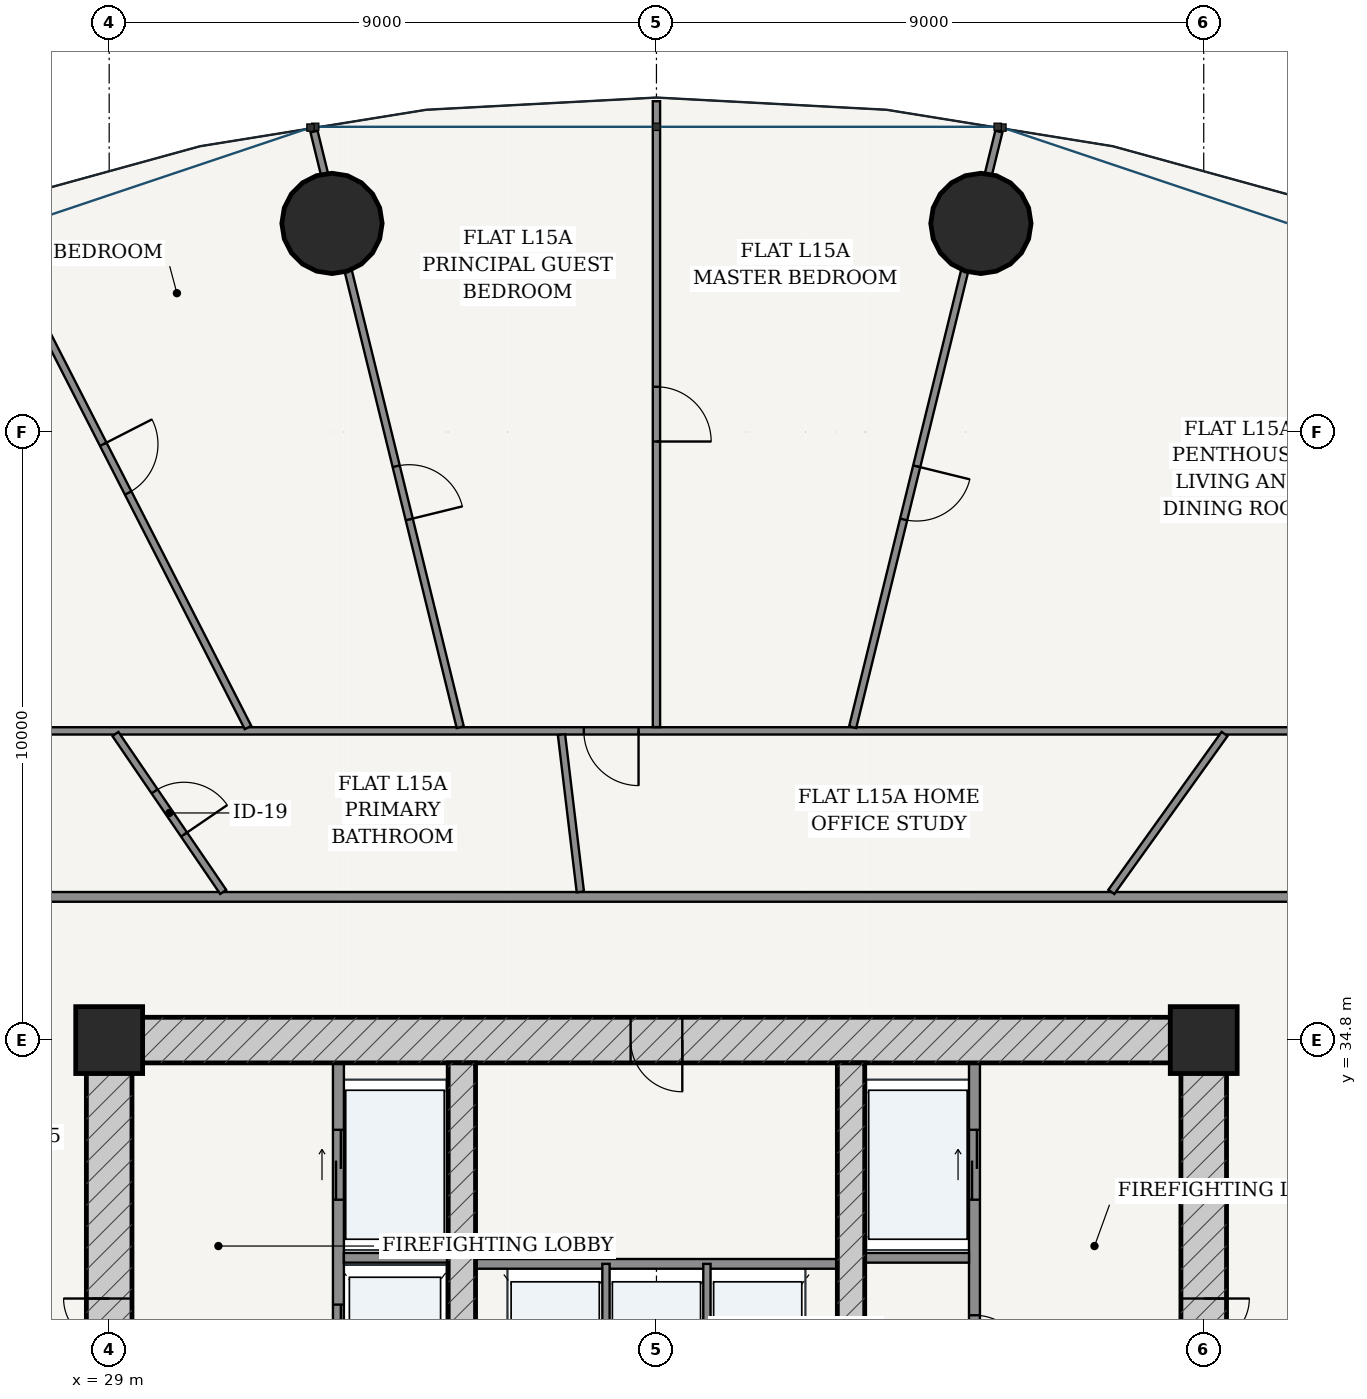
"""IFC4 building model, lengths in metres.
Left out: names, types, materials, properties, quantities, classifications, styles, units other than length and angle.
Written with IfcOpenShell. Run it as: python <this file> out.ifc"""

import sys

from ifc_helpers import new_model, si_unit, direction, frame, frame_2d, origin, origin_2d, place, context, subcontext, project, spatial, rectangle, hollow_circle, extrude, source, transform, mapped, element, fill, save


model = new_model("IFC4")
c1 = context("Model", 3, precision=1e-05, world=origin(), true_north=direction((-0.2419218956, 0.970295726276)))
c2 = subcontext(c1, "Body", "Model", "MODEL_VIEW")
j1 = project(units=[si_unit("LENGTHUNIT", "METRE"), si_unit("PLANEANGLEUNIT", "RADIAN")], contexts=[c1])
p1 = place(None, origin())
s1 = spatial("IfcSite", under=j1, at=p1, CompositionType="ELEMENT")
p2 = place(p1, origin())
s2 = spatial("IfcBuilding", under=s1, at=p2, CompositionType="ELEMENT")
p3 = place(p2, frame((0.0, 0.0, 60.0)))
s3 = spatial("IfcBuildingStorey", under=s2, at=p3, CompositionType="ELEMENT", Elevation=60.0)
for number, where, z_axis, x_axis in (
    (1, (47.0, 34.8, 0.0), (0.0, 0.0, 1.0), (1.0, 0.0, 0.0)),
    (2, (29.0, 34.8, 0.0), (0.0, 0.0, 1.0), (1.0, 0.0, 0.0)),
):
    element("IfcColumn", number, at=place(p3, frame(where, z_axis=z_axis, x_axis=x_axis)), inside=s3, PredefinedType="COLUMN", context=c2, shape_type="SweptSolid", body=[
        extrude(rectangle(XDim=1.1, YDim=1.1, at=origin_2d()), origin(), (0.0, 0.0, 1.0), 3.6),
    ])
p4 = place(p3, frame((28.625, 34.8, 0.0), z_axis=(0.0, 0.0, 1.0), x_axis=(1.0, 0.0, 0.0)))
e3 = element("IfcWall", 3, at=p4, inside=s3, PredefinedType="SHEAR", context=c2, shape_type="SweptSolid", body=[
    extrude(rectangle(XDim=18.75, YDim=0.75, at=frame_2d((9.375, 0.0))), origin(), (0.0, 0.0, 1.0), 3.32),
])
p5 = place(p4, frame((8.95, 0.0, 0.0)))
e4 = element("IfcOpeningElement", 4, at=p5, cuts=e3, PredefinedType="OPENING", context=c2, shape_type="SweptSolid", body=[
    extrude(rectangle(XDim=0.85, YDim=2.1, at=frame_2d((0.425, 1.05))), frame((0.0, 0.385, 0.0), z_axis=(0.0, -1.0, 0.0), x_axis=(1.0, 0.0, 0.0)), (0.0, 0.0, 1.0), 0.77),
])
p6 = place(p3, frame((29.0, 19.175, 0.0), z_axis=(0.0, 0.0, 1.0), x_axis=(0.0, 1.0, 0.0)))
e5 = element("IfcWall", 5, at=p6, inside=s3, PredefinedType="SHEAR", context=c2, shape_type="SweptSolid", body=[
    extrude(rectangle(XDim=15.25, YDim=0.75, at=frame_2d((7.625, 0.0))), origin(), (0.0, 0.0, 1.0), 3.32),
])
p7 = place(p6, frame((9.875, 0.0, 0.0)))
e6 = element("IfcOpeningElement", 6, at=p7, cuts=e5, PredefinedType="OPENING", context=c2, shape_type="SweptSolid", body=[
    extrude(rectangle(XDim=1.5, YDim=2.2, at=frame_2d((0.75, 1.1))), frame((0.0, 0.385, 0.0), z_axis=(0.0, -1.0, 0.0), x_axis=(1.0, 0.0, 0.0)), (0.0, 0.0, 1.0), 0.77),
])
p8 = place(p3, frame((47.0, 19.175, 0.0), z_axis=(0.0, 0.0, 1.0), x_axis=(0.0, 1.0, 0.0)))
e7 = element("IfcWall", 7, at=p8, inside=s3, PredefinedType="SHEAR", context=c2, shape_type="SweptSolid", body=[
    extrude(rectangle(XDim=15.25, YDim=0.75, at=frame_2d((7.625, 0.0))), origin(), (0.0, 0.0, 1.0), 3.32),
])
p9 = place(p8, frame((9.875, 0.0, 0.0)))
e8 = element("IfcOpeningElement", 8, at=p9, cuts=e7, PredefinedType="OPENING", context=c2, shape_type="SweptSolid", body=[
    extrude(rectangle(XDim=1.5, YDim=2.2, at=frame_2d((0.75, 1.1))), frame((0.0, 0.385, 0.0), z_axis=(0.0, -1.0, 0.0), x_axis=(1.0, 0.0, 0.0)), (0.0, 0.0, 1.0), 0.77),
])
p10 = place(p3, frame((34.8, 19.175, 0.0), z_axis=(0.0, 0.0, 1.0), x_axis=(0.0, 1.0, 0.0)))
e9 = element("IfcWall", 9, at=p10, inside=s3, PredefinedType="SHEAR", context=c2, shape_type="SweptSolid", body=[
    extrude(rectangle(XDim=15.25, YDim=0.45, at=frame_2d((7.625, 0.0))), origin(), (0.0, 0.0, 1.0), 3.32),
])
p11 = place(p10, frame((7.8, 0.0, 0.0)))
e10 = element("IfcOpeningElement", 10, at=p11, cuts=e9, PredefinedType="OPENING", context=c2, shape_type="SweptSolid", body=[
    extrude(rectangle(XDim=1.05, YDim=2.15, at=frame_2d((0.525, 1.075))), frame((0.0, 0.235, 0.0), z_axis=(0.0, -1.0, 0.0), x_axis=(1.0, 0.0, 0.0)), (0.0, 0.0, 1.0), 0.47),
])
p12 = place(p3, frame((41.2, 19.175, 0.0), z_axis=(0.0, 0.0, 1.0), x_axis=(0.0, 1.0, 0.0)))
e11 = element("IfcWall", 11, at=p12, inside=s3, PredefinedType="SHEAR", context=c2, shape_type="SweptSolid", body=[
    extrude(rectangle(XDim=15.25, YDim=0.45, at=frame_2d((7.625, 0.0))), origin(), (0.0, 0.0, 1.0), 3.32),
])
p13 = place(p12, frame((7.8, 0.0, 0.0)))
e12 = element("IfcOpeningElement", 12, at=p13, cuts=e11, PredefinedType="OPENING", context=c2, shape_type="SweptSolid", body=[
    extrude(rectangle(XDim=1.05, YDim=2.15, at=frame_2d((0.525, 1.075))), frame((0.0, 0.235, 0.0), z_axis=(0.0, -1.0, 0.0), x_axis=(1.0, 0.0, 0.0)), (0.0, 0.0, 1.0), 0.47),
])
for number, where, z_axis, x_axis in (
    (13, (43.336, 48.23, 0.0), (0.0, 0.0, 1.0), (1.0, 0.0, 0.0)),
    (14, (32.664, 48.23, 0.0), (0.0, 0.0, 1.0), (1.0, 0.0, 0.0)),
):
    element("IfcColumn", number, at=place(p3, frame(where, z_axis=z_axis, x_axis=x_axis)), inside=s3, PredefinedType="COLUMN", context=c2, shape_type="SweptSolid", body=[
        extrude(hollow_circle(Radius=0.825, WallThickness=0.05, at=origin_2d()), origin(), (0.0, 0.0, 1.0), 3.6),
    ])
p14 = place(p3, frame((32.77, 28.52, 0.0), z_axis=(0.0, 0.0, 1.0), x_axis=(0.0, 1.0, 0.0)))
e15 = element("IfcWall", 15, at=p14, inside=s3, PredefinedType="PARTITIONING", context=c2, shape_type="SweptSolid", body=[
    extrude(rectangle(XDim=5.905, YDim=0.18, at=frame_2d((2.953, 0.0))), origin(), (0.0, 0.0, 1.0), 3.32),
])
p15 = place(p14, frame((3.655, 0.0, 0.0)))
e16 = element("IfcOpeningElement", 16, at=p15, cuts=e15, PredefinedType="OPENING", context=c2, shape_type="SweptSolid", body=[
    extrude(rectangle(XDim=1.15, YDim=2.2, at=frame_2d((0.575, 1.1))), frame((0.0, 0.1, 0.0), z_axis=(0.0, -1.0, 0.0), x_axis=(1.0, 0.0, 0.0)), (0.0, 0.0, 1.0), 0.2),
])
p16 = place(p14, frame((0.73, 0.0, 0.0)))
e17 = element("IfcOpeningElement", 17, at=p16, cuts=e15, PredefinedType="OPENING", context=c2, shape_type="SweptSolid", body=[
    extrude(rectangle(XDim=1.2, YDim=2.25, at=frame_2d((0.6, 1.125))), frame((0.0, 0.1, 0.0), z_axis=(0.0, -1.0, 0.0), x_axis=(1.0, 0.0, 0.0)), (0.0, 0.0, 1.0), 0.2),
])
p17 = place(p3, frame((32.86, 31.22, 0.0), z_axis=(0.0, 0.0, 1.0), x_axis=(1.0, 0.0, 0.0)))
e18 = element("IfcWall", 18, at=p17, inside=s3, PredefinedType="PARTITIONING", context=c2, shape_type="SweptSolid", body=[
    extrude(rectangle(XDim=1.715, YDim=0.16, at=frame_2d((0.857, 0.0))), origin(), (0.0, 0.0, 1.0), 3.32),
])
p18 = place(p3, frame((43.23, 28.52, 0.0), z_axis=(0.0, 0.0, 1.0), x_axis=(0.0, 1.0, 0.0)))
e19 = element("IfcWall", 19, at=p18, inside=s3, PredefinedType="PARTITIONING", context=c2, shape_type="SweptSolid", body=[
    extrude(rectangle(XDim=5.905, YDim=0.18, at=frame_2d((2.953, 0.0))), origin(), (0.0, 0.0, 1.0), 3.32),
])
p19 = place(p18, frame((0.905, 0.0, 0.0)))
e20 = element("IfcOpeningElement", 20, at=p19, cuts=e19, PredefinedType="OPENING", context=c2, shape_type="SweptSolid", body=[
    extrude(rectangle(XDim=0.85, YDim=2.1, at=frame_2d((0.425, 1.05))), frame((0.0, 0.1, 0.0), z_axis=(0.0, -1.0, 0.0), x_axis=(1.0, 0.0, 0.0)), (0.0, 0.0, 1.0), 0.2),
])
p20 = place(p18, frame((3.655, 0.0, 0.0)))
e21 = element("IfcOpeningElement", 21, at=p20, cuts=e19, PredefinedType="OPENING", context=c2, shape_type="SweptSolid", body=[
    extrude(rectangle(XDim=1.15, YDim=2.2, at=frame_2d((0.575, 1.1))), frame((0.0, 0.1, 0.0), z_axis=(0.0, -1.0, 0.0), x_axis=(1.0, 0.0, 0.0)), (0.0, 0.0, 1.0), 0.2),
])
p21 = place(p3, frame((41.425, 31.22, 0.0), z_axis=(0.0, 0.0, 1.0), x_axis=(1.0, 0.0, 0.0)))
e22 = element("IfcWall", 22, at=p21, inside=s3, PredefinedType="PARTITIONING", context=c2, shape_type="SweptSolid", body=[
    extrude(rectangle(XDim=1.715, YDim=0.16, at=frame_2d((0.857, 0.0))), origin(), (0.0, 0.0, 1.0), 3.32),
])
p22 = place(p3, frame((35.025, 31.12, 0.0), z_axis=(0.0, 0.0, 1.0), x_axis=(1.0, 0.0, 0.0)))
e23 = element("IfcWall", 23, at=p22, inside=s3, PredefinedType="PARTITIONING", context=c2, shape_type="SweptSolid", body=[
    extrude(rectangle(XDim=5.95, YDim=0.16, at=frame_2d((2.975, 0.0))), origin(), (0.0, 0.0, 1.0), 3.32),
])
for number, where, z_axis, x_axis in (
    (24, (37.17, 28.56, 0.0), (0.0, 0.0, 1.0), (0.0, 1.0, 0.0)),
    (25, (38.83, 28.56, 0.0), (0.0, 0.0, 1.0), (0.0, 1.0, 0.0)),
):
    element("IfcWall", number, at=place(p3, frame(where, z_axis=z_axis, x_axis=x_axis)), inside=s3, PredefinedType="PARTITIONING", context=c2, shape_type="SweptSolid", body=[
        extrude(rectangle(XDim=2.56, YDim=0.12, at=frame_2d((1.28, 0.0))), origin(), (0.0, 0.0, 1.0), 3.32),
    ])
p23 = place(p3, frame((26.645, 37.155, 0.0), z_axis=(0.0, 0.0, 1.0), x_axis=(1.0, 0.0, 0.0)))
e26 = element("IfcWall", 26, at=p23, inside=s3, PredefinedType="PARTITIONING", context=c2, shape_type="SweptSolid", body=[
    extrude(rectangle(XDim=22.71, YDim=0.16, at=frame_2d((11.355, 0.0))), origin(), (0.0, 0.0, 1.0), 2.688),
])
p24 = place(p3, frame((23.915, 39.885, 0.0), z_axis=(0.0, 0.0, 1.0), x_axis=(1.0, 0.0, 0.0)))
e27 = element("IfcWall", 27, at=p24, inside=s3, PredefinedType="PARTITIONING", context=c2, shape_type="SweptSolid", body=[
    extrude(rectangle(XDim=28.17, YDim=0.12, at=frame_2d((14.085, 0.0))), origin(), (0.0, 0.0, 1.0), 2.688),
])
p25 = place(p24, frame((12.891, 0.0, 0.0)))
e28 = element("IfcOpeningElement", 28, at=p25, cuts=e27, PredefinedType="OPENING", context=c2, shape_type="SweptSolid", body=[
    extrude(rectangle(XDim=0.9, YDim=2.15, at=frame_2d((0.45, 1.075))), frame((0.0, 0.07, 0.0), z_axis=(0.0, -1.0, 0.0), x_axis=(1.0, 0.0, 0.0)), (0.0, 0.0, 1.0), 0.14),
])
p26 = place(p3, frame((41.227, 39.945, 0.0), z_axis=(0.0, 0.0, 1.0), x_axis=(0.238375747469, 0.97117300365, 0.0)))
e29 = element("IfcWall", 29, at=p26, inside=s3, PredefinedType="PARTITIONING", context=c2, shape_type="SweptSolid", body=[
    extrude(rectangle(XDim=10.086, YDim=0.12, at=frame_2d((5.043, 0.0))), origin(), (0.0, 0.0, 1.0), 2.688),
])
p27 = place(p26, frame((3.518, 0.0, 0.0)))
e30 = element("IfcOpeningElement", 30, at=p27, cuts=e29, PredefinedType="OPENING", context=c2, shape_type="SweptSolid", body=[
    extrude(rectangle(XDim=0.9, YDim=2.15, at=frame_2d((0.45, 1.075))), frame((0.0, 0.07, 0.0), z_axis=(0.0, -1.0, 0.0), x_axis=(1.0, 0.0, 0.0)), (0.0, 0.0, 1.0), 0.14),
])
p28 = place(p3, frame((38.0, 39.947, 0.0), z_axis=(0.0, 0.0, 1.0), x_axis=(0.0, 1.0, 0.0)))
e31 = element("IfcWall", 31, at=p28, inside=s3, PredefinedType="PARTITIONING", context=c2, shape_type="SweptSolid", body=[
    extrude(rectangle(XDim=10.293, YDim=0.12, at=frame_2d((5.146, 0.0))), origin(), (0.0, 0.0, 1.0), 2.762),
])
p29 = place(p28, frame((4.697, 0.0, 0.0)))
e32 = element("IfcOpeningElement", 32, at=p29, cuts=e31, PredefinedType="OPENING", context=c2, shape_type="SweptSolid", body=[
    extrude(rectangle(XDim=0.9, YDim=2.15, at=frame_2d((0.45, 1.075))), frame((0.0, 0.07, 0.0), z_axis=(0.0, -1.0, 0.0), x_axis=(1.0, 0.0, 0.0)), (0.0, 0.0, 1.0), 0.14),
])
p30 = place(p3, frame((34.773, 39.945, 0.0), z_axis=(0.0, 0.0, 1.0), x_axis=(-0.238375747469, 0.97117300365, 0.0)))
e33 = element("IfcWall", 33, at=p30, inside=s3, PredefinedType="PARTITIONING", context=c2, shape_type="SweptSolid", body=[
    extrude(rectangle(XDim=10.086, YDim=0.12, at=frame_2d((5.043, 0.0))), origin(), (0.0, 0.0, 1.0), 2.688),
])
p31 = place(p30, frame((3.519, 0.0, 0.0)))
e34 = element("IfcOpeningElement", 34, at=p31, cuts=e33, PredefinedType="OPENING", context=c2, shape_type="SweptSolid", body=[
    extrude(rectangle(XDim=0.9, YDim=2.15, at=frame_2d((0.45, 1.075))), frame((0.0, 0.07, 0.0), z_axis=(0.0, -1.0, 0.0), x_axis=(1.0, 0.0, 0.0)), (0.0, 0.0, 1.0), 0.14),
])
p32 = place(p3, frame((31.283, 39.94, 0.0), z_axis=(0.0, 0.0, 1.0), x_axis=(-0.455131303234, 0.890424335256, 0.0)))
e35 = element("IfcWall", 35, at=p32, inside=s3, PredefinedType="PARTITIONING", context=c2, shape_type="SweptSolid", body=[
    extrude(rectangle(XDim=9.562, YDim=0.12, at=frame_2d((4.781, 0.0))), origin(), (0.0, 0.0, 1.0), 2.762),
])
p33 = place(p32, frame((4.331, 0.0, 0.0)))
e36 = element("IfcOpeningElement", 36, at=p33, cuts=e35, PredefinedType="OPENING", context=c2, shape_type="SweptSolid", body=[
    extrude(rectangle(XDim=0.9, YDim=2.15, at=frame_2d((0.45, 1.075))), frame((0.0, 0.07, 0.0), z_axis=(0.0, -1.0, 0.0), x_axis=(1.0, 0.0, 0.0)), (0.0, 0.0, 1.0), 0.14),
])
p34 = place(p3, frame((45.481, 37.237, 0.0), z_axis=(0.0, 0.0, 1.0), x_axis=(0.582530715463, 0.812808689387, 0.0)))
e37 = element("IfcWall", 37, at=p34, inside=s3, PredefinedType="PARTITIONING", context=c2, shape_type="SweptSolid", body=[
    extrude(rectangle(XDim=3.197, YDim=0.12, at=frame_2d((1.598, 0.0))), origin(), (0.0, 0.0, 1.0), 3.32),
])
p35 = place(p3, frame((36.749, 37.237, 0.0), z_axis=(0.0, 0.0, 1.0), x_axis=(-0.119119351225, 0.992879942472, 0.0)))
e38 = element("IfcWall", 38, at=p35, inside=s3, PredefinedType="PARTITIONING", context=c2, shape_type="SweptSolid", body=[
    extrude(rectangle(XDim=2.605, YDim=0.12, at=frame_2d((1.302, 0.0))), origin(), (0.0, 0.0, 1.0), 3.32),
])
p36 = place(p3, frame((30.875, 37.237, 0.0), z_axis=(0.0, 0.0, 1.0), x_axis=(-0.563751131022, 0.825944708967, 0.0)))
e39 = element("IfcWall", 39, at=p36, inside=s3, PredefinedType="PARTITIONING", context=c2, shape_type="SweptSolid", body=[
    extrude(rectangle(XDim=3.145, YDim=0.12, at=frame_2d((1.572, 0.0))), origin(), (0.0, 0.0, 1.0), 3.32),
])
p37 = place(p36, frame((1.142, 0.0, 0.0)))
e40 = element("IfcOpeningElement", 40, at=p37, cuts=e39, PredefinedType="OPENING", context=c2, shape_type="SweptSolid", body=[
    extrude(rectangle(XDim=0.86, YDim=2.15, at=frame_2d((0.43, 1.075))), frame((0.0, 0.07, 0.0), z_axis=(0.0, -1.0, 0.0), x_axis=(1.0, 0.0, 0.0)), (0.0, 0.0, 1.0), 0.14),
])
m1 = source(origin(), c2, "Body", "SweptSolid", [
    extrude(rectangle(XDim=1.5, YDim=2.2, at=frame_2d((0.75, 1.1))), frame((0.0, 0.025, 0.0), z_axis=(0.0, -1.0, 0.0), x_axis=(1.0, 0.0, 0.0)), (0.0, 0.0, 1.0), 0.05),
])
p38 = place(p7, origin())
e41 = element("IfcDoor", 41, at=p38, inside=s3, OperationType="DOUBLE_DOOR_SINGLE_SWING", PredefinedType="DOOR", context=c2, shape_type="MappedRepresentation", body=[
    mapped(m1, transform((0.0, 0.0, 0.0), scale=1.0)),
])
fill(e6, e41)
p39 = place(p9, frame((1.5, 0.0, 0.0), z_axis=(0.0, 0.0, 1.0), x_axis=(-1.0, 0.0, 0.0)))
e42 = element("IfcDoor", 42, at=p39, inside=s3, OperationType="DOUBLE_DOOR_SINGLE_SWING", PredefinedType="DOOR", context=c2, shape_type="MappedRepresentation", body=[
    mapped(m1, transform((0.0, 0.0, 0.0), scale=1.0)),
])
fill(e8, e42)
m2 = source(origin(), c2, "Body", "SweptSolid", [
    extrude(rectangle(XDim=0.85, YDim=2.1, at=frame_2d((0.425, 1.05))), frame((0.0, 0.025, 0.0), z_axis=(0.0, -1.0, 0.0), x_axis=(1.0, 0.0, 0.0)), (0.0, 0.0, 1.0), 0.05),
])
p40 = place(p19, frame((0.85, 0.0, 0.0), z_axis=(0.0, 0.0, 1.0), x_axis=(-1.0, 0.0, 0.0)))
e43 = element("IfcDoor", 43, at=p40, inside=s3, OperationType="SINGLE_SWING_RIGHT", PredefinedType="DOOR", context=c2, shape_type="MappedRepresentation", body=[
    mapped(m2, transform((0.0, 0.0, 0.0), scale=1.0)),
])
fill(e20, e43)
p41 = place(p5, frame((0.85, 0.0, 0.0), z_axis=(0.0, 0.0, 1.0), x_axis=(-1.0, 0.0, 0.0)))
e44 = element("IfcDoor", 44, at=p41, inside=s3, OperationType="SINGLE_SWING_LEFT", PredefinedType="DOOR", context=c2, shape_type="MappedRepresentation", body=[
    mapped(m2, transform((0.0, 0.0, 0.0), scale=1.0)),
])
fill(e4, e44)
m3 = source(origin(), c2, "Body", "SweptSolid", [
    extrude(rectangle(XDim=1.15, YDim=2.2, at=frame_2d((0.575, 1.1))), frame((0.0, 0.025, 0.0), z_axis=(0.0, -1.0, 0.0), x_axis=(1.0, 0.0, 0.0)), (0.0, 0.0, 1.0), 0.05),
])
p42 = place(p15, origin())
e45 = element("IfcDoor", 45, at=p42, inside=s3, OperationType="DOUBLE_DOOR_SLIDING", PredefinedType="DOOR", context=c2, shape_type="MappedRepresentation", body=[
    mapped(m3, transform((0.0, 0.0, 0.0), scale=1.0)),
])
fill(e16, e45)
p43 = place(p20, origin())
e46 = element("IfcDoor", 46, at=p43, inside=s3, OperationType="DOUBLE_DOOR_SLIDING", PredefinedType="DOOR", context=c2, shape_type="MappedRepresentation", body=[
    mapped(m3, transform((0.0, 0.0, 0.0), scale=1.0)),
])
fill(e21, e46)
m4 = source(origin(), c2, "Body", "SweptSolid", [
    extrude(rectangle(XDim=1.2, YDim=2.25, at=frame_2d((0.6, 1.125))), frame((0.0, 0.025, 0.0), z_axis=(0.0, -1.0, 0.0), x_axis=(1.0, 0.0, 0.0)), (0.0, 0.0, 1.0), 0.05),
])
p44 = place(p16, origin())
e47 = element("IfcDoor", 47, at=p44, inside=s3, OperationType="DOUBLE_DOOR_SLIDING", PredefinedType="DOOR", context=c2, shape_type="MappedRepresentation", body=[
    mapped(m4, transform((0.0, 0.0, 0.0), scale=1.0)),
])
fill(e17, e47)
m5 = source(origin(), c2, "Body", "SweptSolid", [
    extrude(rectangle(XDim=0.86, YDim=2.15, at=frame_2d((0.43, 1.075))), frame((0.0, 0.025, 0.0), z_axis=(0.0, -1.0, 0.0), x_axis=(1.0, 0.0, 0.0)), (0.0, 0.0, 1.0), 0.05),
])
p45 = place(p37, frame((0.86, 0.0, 0.0), z_axis=(0.0, 0.0, 1.0), x_axis=(-1.0, 0.0, 0.0)))
e48 = element("IfcDoor", 48, at=p45, inside=s3, OperationType="SINGLE_SWING_RIGHT", PredefinedType="DOOR", context=c2, shape_type="MappedRepresentation", body=[
    mapped(m5, transform((0.0, 0.0, 0.0), scale=1.0)),
])
fill(e40, e48)
m6 = source(origin(), c2, "Body", "SweptSolid", [
    extrude(rectangle(XDim=0.9, YDim=2.15, at=frame_2d((0.45, 1.075))), frame((0.0, 0.025, 0.0), z_axis=(0.0, -1.0, 0.0), x_axis=(1.0, 0.0, 0.0)), (0.0, 0.0, 1.0), 0.05),
])
p46 = place(p33, frame((0.9, 0.0, 0.0), z_axis=(0.0, 0.0, 1.0), x_axis=(-1.0, 0.0, 0.0)))
e49 = element("IfcDoor", 49, at=p46, inside=s3, OperationType="SINGLE_SWING_LEFT", PredefinedType="DOOR", context=c2, shape_type="MappedRepresentation", body=[
    mapped(m6, transform((0.0, 0.0, 0.0), scale=1.0)),
])
fill(e36, e49)
p47 = place(p31, frame((0.9, 0.0, 0.0), z_axis=(0.0, 0.0, 1.0), x_axis=(-1.0, 0.0, 0.0)))
e50 = element("IfcDoor", 50, at=p47, inside=s3, OperationType="SINGLE_SWING_RIGHT", PredefinedType="DOOR", context=c2, shape_type="MappedRepresentation", body=[
    mapped(m6, transform((0.0, 0.0, 0.0), scale=1.0)),
])
fill(e34, e50)
p48 = place(p25, frame((0.9, 0.0, 0.0), z_axis=(0.0, 0.0, 1.0), x_axis=(-1.0, 0.0, 0.0)))
e51 = element("IfcDoor", 51, at=p48, inside=s3, OperationType="SINGLE_SWING_LEFT", PredefinedType="DOOR", context=c2, shape_type="MappedRepresentation", body=[
    mapped(m6, transform((0.0, 0.0, 0.0), scale=1.0)),
])
fill(e28, e51)
p49 = place(p29, frame((0.9, 0.0, 0.0), z_axis=(0.0, 0.0, 1.0), x_axis=(-1.0, 0.0, 0.0)))
e52 = element("IfcDoor", 52, at=p49, inside=s3, OperationType="SINGLE_SWING_RIGHT", PredefinedType="DOOR", context=c2, shape_type="MappedRepresentation", body=[
    mapped(m6, transform((0.0, 0.0, 0.0), scale=1.0)),
])
fill(e32, e52)
p50 = place(p27, frame((0.9, 0.0, 0.0), z_axis=(0.0, 0.0, 1.0), x_axis=(-1.0, 0.0, 0.0)))
e53 = element("IfcDoor", 53, at=p50, inside=s3, OperationType="SINGLE_SWING_LEFT", PredefinedType="DOOR", context=c2, shape_type="MappedRepresentation", body=[
    mapped(m6, transform((0.0, 0.0, 0.0), scale=1.0)),
])
fill(e30, e53)
save(model, sys.argv[1])
